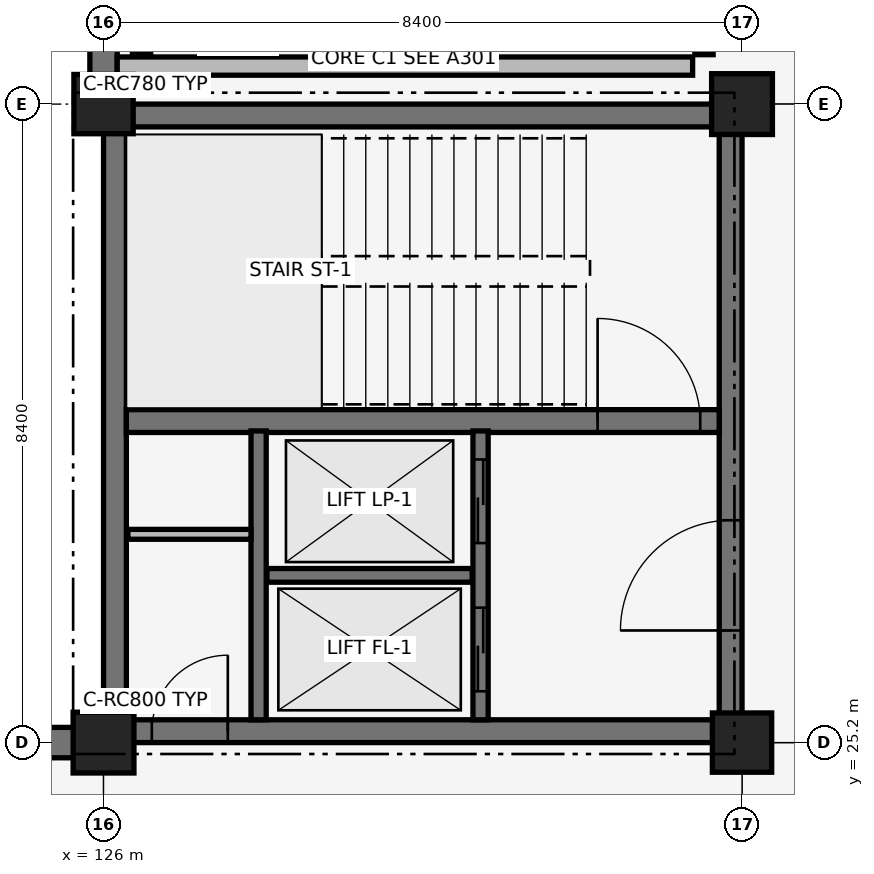
"""IFC4 building model, lengths in metres.
Left out: names, types, materials, properties, quantities, classifications, styles, units other than length and angle.
Written with IfcOpenShell. Run it as: python <this file> out.ifc"""

import sys

from ifc_helpers import new_model, si_unit, direction, frame, frame_2d, origin, origin_2d, place, context, subcontext, project, spatial, rectangle, extrude, element, fill, save


model = new_model("IFC4")
c1 = context("Model", 3, precision=1e-05, world=origin(), true_north=direction((0.0, 1.0)))
c2 = subcontext(c1, "Body", "Model", "MODEL_VIEW")
j1 = project(units=[si_unit("LENGTHUNIT", "METRE"), si_unit("PLANEANGLEUNIT", "RADIAN")], contexts=[c1])
p1 = place(None, origin())
s1 = spatial("IfcSite", under=j1, at=p1, CompositionType="ELEMENT")
p2 = place(p1, origin())
s2 = spatial("IfcBuilding", under=s1, at=p2, CompositionType="ELEMENT")
p3 = place(p2, frame((0.0, 0.0, -4.42)))
s3 = spatial("IfcBuildingStorey", under=s2, at=p3, CompositionType="ELEMENT", Elevation=-4.42)
p4 = place(p3, frame((117.95, 25.2, 0.0), z_axis=(0.0, 0.0, 1.0), x_axis=(1.0, 0.0, 0.0)))
e1 = element("IfcWall", 1, at=p4, inside=s3, PredefinedType="USERDEFINED", context=c2, shape_type="SweptSolid", body=[
    extrude(rectangle(XDim=7.7, YDim=0.4, at=frame_2d((3.85, 0.0))), origin(), (0.0, 0.0, 1.0), 4.12),
])
p5 = place(p3, frame((126.0, 33.95, 0.0), z_axis=(0.0, 0.0, 1.0), x_axis=(0.0, 1.0, 0.0)))
e2 = element("IfcWall", 2, at=p5, inside=s3, PredefinedType="USERDEFINED", context=c2, shape_type="SweptSolid", body=[
    extrude(rectangle(XDim=7.7, YDim=0.36, at=frame_2d((3.85, 0.0))), origin(), (0.0, 0.0, 1.0), 4.12),
])
p6 = place(p3, frame((126.15, 25.35, 0.0), z_axis=(0.0, 0.0, 1.0), x_axis=(1.0, 0.0, 0.0)))
e3 = element("IfcWall", 3, at=p6, inside=s3, PredefinedType="SHEAR", context=c2, shape_type="SweptSolid", body=[
    extrude(rectangle(XDim=8.1, YDim=0.3, at=frame_2d((4.05, 0.0))), origin(), (0.0, 0.0, 1.0), 4.12),
])
p7 = place(p6, frame((0.485, 0.0, 0.0)))
e4 = element("IfcOpeningElement", 4, at=p7, cuts=e3, PredefinedType="OPENING", context=c2, shape_type="SweptSolid", body=[
    extrude(rectangle(XDim=1.0, YDim=2.15, at=frame_2d((0.5, 1.075))), frame((0.0, 0.16, 0.0), z_axis=(0.0, -1.0, 0.0), x_axis=(1.0, 0.0, 0.0)), (0.0, 0.0, 1.0), 0.32),
])
p8 = place(p3, frame((126.15, 33.45, 0.0), z_axis=(0.0, 0.0, 1.0), x_axis=(1.0, 0.0, 0.0)))
e5 = element("IfcWall", 5, at=p8, inside=s3, PredefinedType="SHEAR", context=c2, shape_type="SweptSolid", body=[
    extrude(rectangle(XDim=8.1, YDim=0.3, at=frame_2d((4.05, 0.0))), origin(), (0.0, 0.0, 1.0), 4.12),
])
p9 = place(p3, frame((126.15, 25.35, 0.0), z_axis=(0.0, 0.0, 1.0), x_axis=(0.0, 1.0, 0.0)))
e6 = element("IfcWall", 6, at=p9, inside=s3, PredefinedType="SHEAR", context=c2, shape_type="SweptSolid", body=[
    extrude(rectangle(XDim=8.1, YDim=0.3, at=frame_2d((4.05, 0.0))), origin(), (0.0, 0.0, 1.0), 4.12),
])
p10 = place(p3, frame((134.25, 25.35, 0.0), z_axis=(0.0, 0.0, 1.0), x_axis=(0.0, 1.0, 0.0)))
e7 = element("IfcWall", 7, at=p10, inside=s3, PredefinedType="SHEAR", context=c2, shape_type="SweptSolid", body=[
    extrude(rectangle(XDim=8.1, YDim=0.3, at=frame_2d((4.05, 0.0))), origin(), (0.0, 0.0, 1.0), 4.12),
])
p11 = place(p10, frame((1.325, 0.0, 0.0)))
e8 = element("IfcOpeningElement", 8, at=p11, cuts=e7, PredefinedType="OPENING", context=c2, shape_type="SweptSolid", body=[
    extrude(rectangle(XDim=1.45, YDim=2.15, at=frame_2d((0.725, 1.075))), frame((0.0, 0.16, 0.0), z_axis=(0.0, -1.0, 0.0), x_axis=(1.0, 0.0, 0.0)), (0.0, 0.0, 1.0), 0.32),
])
p12 = place(p3, frame((126.3, 29.43, 0.0), z_axis=(0.0, 0.0, 1.0), x_axis=(1.0, 0.0, 0.0)))
e9 = element("IfcWall", 9, at=p12, inside=s3, PredefinedType="SHEAR", context=c2, shape_type="SweptSolid", body=[
    extrude(rectangle(XDim=7.8, YDim=0.3, at=frame_2d((3.9, 0.0))), origin(), (0.0, 0.0, 1.0), 4.12),
])
p13 = place(p12, frame((6.2, 0.0, 0.0)))
e10 = element("IfcOpeningElement", 10, at=p13, cuts=e9, PredefinedType="OPENING", context=c2, shape_type="SweptSolid", body=[
    extrude(rectangle(XDim=1.35, YDim=2.15, at=frame_2d((0.675, 1.075))), frame((0.0, 0.16, 0.0), z_axis=(0.0, -1.0, 0.0), x_axis=(1.0, 0.0, 0.0)), (0.0, 0.0, 1.0), 0.32),
])
p14 = place(p3, frame((126.0, 25.2, -0.4), z_axis=(0.0, 0.0, 1.0), x_axis=(1.0, 0.0, 0.0)))
e11 = element("IfcColumn", 11, at=p14, inside=s3, PredefinedType="COLUMN", context=c2, shape_type="SweptSolid", body=[
    extrude(rectangle(XDim=0.8, YDim=0.8, at=origin_2d()), origin(), (0.0, 0.0, 1.0), 4.52),
])
for number, where, z_axis, x_axis in (
    (12, (126.0, 33.6, -0.4), (0.0, 0.0, 1.0), (1.0, 0.0, 0.0)),
    (13, (134.4, 25.2, -0.4), (0.0, 0.0, 1.0), (1.0, 0.0, 0.0)),
):
    element("IfcColumn", number, at=place(p3, frame(where, z_axis=z_axis, x_axis=x_axis)), inside=s3, PredefinedType="COLUMN", context=c2, shape_type="SweptSolid", body=[
        extrude(rectangle(XDim=0.78, YDim=0.78, at=origin_2d()), origin(), (0.0, 0.0, 1.0), 4.52),
    ])
p15 = place(p3, frame((134.4, 33.6, -0.4), z_axis=(0.0, 0.0, 1.0), x_axis=(1.0, 0.0, 0.0)))
e14 = element("IfcColumn", 14, at=p15, inside=s3, PredefinedType="COLUMN", context=c2, shape_type="SweptSolid", body=[
    extrude(rectangle(XDim=0.8, YDim=0.8, at=origin_2d()), origin(), (0.0, 0.0, 1.0), 4.52),
])
p16 = place(p3, frame((130.96, 25.5, 0.0), z_axis=(0.0, 0.0, 1.0), x_axis=(0.0, 1.0, 0.0)))
e15 = element("IfcWall", 15, at=p16, inside=s3, PredefinedType="SHEAR", context=c2, shape_type="SweptSolid", body=[
    extrude(rectangle(XDim=3.8, YDim=0.2, at=frame_2d((1.9, 0.0))), origin(), (0.0, 0.0, 1.0), 3.17),
])
p17 = place(p16, frame((0.375, 0.0, 0.0)))
e16 = element("IfcOpeningElement", 16, at=p17, cuts=e15, PredefinedType="OPENING", context=c2, shape_type="SweptSolid", body=[
    extrude(rectangle(XDim=1.1, YDim=2.15, at=frame_2d((0.55, 1.075))), frame((0.0, 0.11, 0.0), z_axis=(0.0, -1.0, 0.0), x_axis=(1.0, 0.0, 0.0)), (0.0, 0.0, 1.0), 0.22),
])
p18 = place(p16, frame((2.325, 0.0, 0.0)))
e17 = element("IfcOpeningElement", 17, at=p18, cuts=e15, PredefinedType="OPENING", context=c2, shape_type="SweptSolid", body=[
    extrude(rectangle(XDim=1.1, YDim=2.15, at=frame_2d((0.55, 1.075))), frame((0.0, 0.11, 0.0), z_axis=(0.0, -1.0, 0.0), x_axis=(1.0, 0.0, 0.0)), (0.0, 0.0, 1.0), 0.22),
])
p19 = place(p3, frame((128.04, 25.5, 0.0), z_axis=(0.0, 0.0, 1.0), x_axis=(0.0, 1.0, 0.0)))
e18 = element("IfcWall", 18, at=p19, inside=s3, PredefinedType="SHEAR", context=c2, shape_type="SweptSolid", body=[
    extrude(rectangle(XDim=3.8, YDim=0.2, at=frame_2d((1.9, 0.0))), origin(), (0.0, 0.0, 1.0), 3.17),
])
p20 = place(p3, frame((128.15, 27.4, 0.0), z_axis=(0.0, 0.0, 1.0), x_axis=(1.0, 0.0, 0.0)))
e19 = element("IfcWall", 19, at=p20, inside=s3, PredefinedType="SHEAR", context=c2, shape_type="SweptSolid", body=[
    extrude(rectangle(XDim=2.7, YDim=0.18, at=frame_2d((1.35, 0.0))), origin(), (0.0, 0.0, 1.0), 4.12),
])
p21 = place(p3, frame((126.32, 27.94, 0.0), z_axis=(0.0, 0.0, 1.0), x_axis=(1.0, 0.0, 0.0)))
e20 = element("IfcWall", 20, at=p21, inside=s3, PredefinedType="PARTITIONING", context=c2, shape_type="SweptSolid", body=[
    extrude(rectangle(XDim=1.62, YDim=0.13, at=frame_2d((0.81, 0.0))), origin(), (0.0, 0.0, 1.0), 3.35),
])
p22 = place(p3, frame((133.9, 34.25, 0.0), z_axis=(0.0, 0.0, 1.0), x_axis=(0.0, 1.0, 0.0)))
e21 = element("IfcWall", 21, at=p22, inside=s3, PredefinedType="PARTITIONING", context=c2, shape_type="SweptSolid", body=[
    extrude(rectangle(XDim=7.3, YDim=0.24, at=frame_2d((3.65, 0.0))), origin(), (0.0, 0.0, 1.0), 3.56),
])
p23 = place(p22, frame((3.1, 0.0, 0.0)))
e22 = element("IfcOpeningElement", 22, at=p23, cuts=e21, PredefinedType="OPENING", context=c2, shape_type="SweptSolid", body=[
    extrude(rectangle(XDim=1.1, YDim=2.15, at=frame_2d((0.55, 1.075))), frame((0.0, 0.13, 0.0), z_axis=(0.0, -1.0, 0.0), x_axis=(1.0, 0.0, 0.0)), (0.0, 0.0, 1.0), 0.26),
])
p24 = place(p3, frame((126.18, 34.1, 0.0), z_axis=(0.0, 0.0, 1.0), x_axis=(1.0, 0.0, 0.0)))
e23 = element("IfcWall", 23, at=p24, inside=s3, PredefinedType="PARTITIONING", context=c2, shape_type="SweptSolid", body=[
    extrude(rectangle(XDim=7.57, YDim=0.24, at=frame_2d((3.785, 0.0))), origin(), (0.0, 0.0, 1.0), 3.35),
])
p25 = place(p3, frame((126.5, 34.25, 0.0), z_axis=(0.0, 0.0, 1.0), x_axis=(0.0, 1.0, 0.0)))
e24 = element("IfcWall", 24, at=p25, inside=s3, PredefinedType="PARTITIONING", context=c2, shape_type="SweptSolid", body=[
    extrude(rectangle(XDim=7.29, YDim=0.24, at=frame_2d((3.645, 0.0))), origin(), (0.0, 0.0, 1.0), 3.56),
])
p26 = place(p13, origin())
e25 = element("IfcDoor", 25, at=p26, inside=s3, OperationType="SINGLE_SWING_LEFT", PredefinedType="DOOR", context=c2, shape_type="SweptSolid", body=[
    extrude(rectangle(XDim=1.35, YDim=2.15, at=frame_2d((0.675, 1.075))), frame((0.0, 0.025, 0.0), z_axis=(0.0, -1.0, 0.0), x_axis=(1.0, 0.0, 0.0)), (0.0, 0.0, 1.0), 0.05),
])
fill(e10, e25)
p27 = place(p17, origin())
e26 = element("IfcDoor", 26, at=p27, inside=s3, OperationType="SLIDING_TO_LEFT", PredefinedType="DOOR", context=c2, shape_type="SweptSolid", body=[
    extrude(rectangle(XDim=1.1, YDim=2.15, at=frame_2d((0.55, 1.075))), frame((0.0, 0.025, 0.0), z_axis=(0.0, -1.0, 0.0), x_axis=(1.0, 0.0, 0.0)), (0.0, 0.0, 1.0), 0.05),
])
fill(e16, e26)
p28 = place(p18, origin())
e27 = element("IfcDoor", 27, at=p28, inside=s3, OperationType="SLIDING_TO_LEFT", PredefinedType="DOOR", context=c2, shape_type="SweptSolid", body=[
    extrude(rectangle(XDim=1.1, YDim=2.15, at=frame_2d((0.55, 1.075))), frame((0.0, 0.025, 0.0), z_axis=(0.0, -1.0, 0.0), x_axis=(1.0, 0.0, 0.0)), (0.0, 0.0, 1.0), 0.05),
])
fill(e17, e27)
p29 = place(p11, origin())
e28 = element("IfcDoor", 28, at=p29, inside=s3, OperationType="DOUBLE_DOOR_SINGLE_SWING", PredefinedType="DOOR", context=c2, shape_type="SweptSolid", body=[
    extrude(rectangle(XDim=1.45, YDim=2.15, at=frame_2d((0.725, 1.075))), frame((0.0, 0.025, 0.0), z_axis=(0.0, -1.0, 0.0), x_axis=(1.0, 0.0, 0.0)), (0.0, 0.0, 1.0), 0.05),
])
fill(e8, e28)
p30 = place(p7, origin())
e29 = element("IfcDoor", 29, at=p30, inside=s3, OperationType="SINGLE_SWING_RIGHT", PredefinedType="DOOR", context=c2, shape_type="SweptSolid", body=[
    extrude(rectangle(XDim=1.0, YDim=2.15, at=frame_2d((0.5, 1.075))), frame((0.0, 0.025, 0.0), z_axis=(0.0, -1.0, 0.0), x_axis=(1.0, 0.0, 0.0)), (0.0, 0.0, 1.0), 0.05),
])
fill(e4, e29)
save(model, sys.argv[1])
